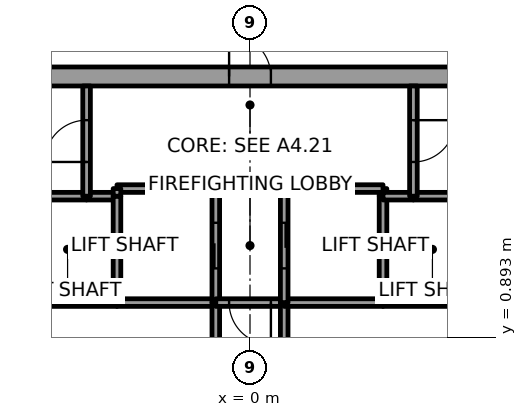
"""IFC4 building model, lengths in metres.
Left out: names, types, materials, properties, quantities, classifications, styles, units other than length and angle.
Written with IfcOpenShell. Run it as: python <this file> out.ifc"""

import sys

from ifc_helpers import new_model, si_unit, direction, frame, frame_2d, origin, place, context, subcontext, project, spatial, rectangle, extrude, element, fill, save


model = new_model("IFC4")
c1 = context("Model", 3, precision=1e-05, world=origin(), true_north=direction((0.0, 1.0)))
c2 = subcontext(c1, "Body", "Model", "MODEL_VIEW")
j1 = project(units=[si_unit("LENGTHUNIT", "METRE"), si_unit("PLANEANGLEUNIT", "RADIAN")], contexts=[c1])
p1 = place(None, origin())
s1 = spatial("IfcSite", under=j1, at=p1, CompositionType="ELEMENT")
p2 = place(p1, origin())
s2 = spatial("IfcBuilding", under=s1, at=p2, CompositionType="ELEMENT")
p3 = place(p2, frame((0.0, 0.0, 92.4)))
s3 = spatial("IfcBuildingStorey", under=s2, at=p3, CompositionType="ELEMENT", Elevation=92.4)
p4 = place(p3, frame((-11.0, 7.75, 0.0), z_axis=(0.0, 0.0, 1.0), x_axis=(1.0, 0.0, 0.0)))
e1 = element("IfcWall", 1, at=p4, inside=s3, PredefinedType="SHEAR", context=c2, shape_type="SweptSolid", body=[
    extrude(rectangle(XDim=22.0, YDim=0.5, at=frame_2d((11.0, 0.0))), origin(), (0.0, 0.0, 1.0), 3.7),
])
p5 = place(p4, frame((10.45, 0.0, 0.0)))
e2 = element("IfcOpeningElement", 2, at=p5, cuts=e1, PredefinedType="OPENING", context=c2, shape_type="SweptSolid", body=[
    extrude(rectangle(XDim=1.1, YDim=2.1, at=frame_2d((0.55, 1.05))), frame((0.0, 0.25, 0.0), z_axis=(0.0, -1.0, 0.0), x_axis=(1.0, 0.0, 0.0)), (0.0, 0.0, 1.0), 0.5),
])
p6 = place(p3, frame((-3.5, 1.8, 0.0), z_axis=(0.0, 0.0, 1.0), x_axis=(-1.0, 0.0, 0.0)))
e3 = element("IfcWall", 3, at=p6, inside=s3, PredefinedType="SOLIDWALL", context=c2, shape_type="SweptSolid", body=[
    extrude(rectangle(XDim=2.6, YDim=0.2, at=frame_2d((1.3, 0.0))), origin(), (0.0, 0.0, 1.0), 3.55),
])
p7 = place(p3, frame((-4.3, 4.6, 0.0), z_axis=(0.0, 0.0, 1.0), x_axis=(-1.0, 0.0, 0.0)))
e4 = element("IfcWall", 4, at=p7, inside=s3, PredefinedType="SOLIDWALL", context=c2, shape_type="SweptSolid", body=[
    extrude(rectangle(XDim=1.8, YDim=0.2, at=frame_2d((0.9, 0.0))), origin(), (0.0, 0.0, 1.0), 3.55),
])
p8 = place(p3, frame((-3.5, 4.6, 0.0), z_axis=(0.0, 0.0, 1.0), x_axis=(-1.0, 0.0, 0.0)))
e5 = element("IfcWall", 5, at=p8, inside=s3, PredefinedType="SOLIDWALL", context=c2, shape_type="SweptSolid", body=[
    extrude(rectangle(XDim=0.8, YDim=0.2, at=frame_2d((0.4, 0.0))), origin(), (0.0, 0.0, 1.0), 3.55),
])
p9 = place(p3, frame((-4.3, 4.6, 0.0), z_axis=(0.0, 0.0, 1.0), x_axis=(0.0, 1.0, 0.0)))
e6 = element("IfcWall", 6, at=p9, inside=s3, PredefinedType="SOLIDWALL", context=c2, shape_type="SweptSolid", body=[
    extrude(rectangle(XDim=2.9, YDim=0.2, at=frame_2d((1.45, 0.0))), origin(), (0.0, 0.0, 1.0), 3.55),
])
p10 = place(p9, frame((0.9, 0.0, 0.0)))
e7 = element("IfcOpeningElement", 7, at=p10, cuts=e6, PredefinedType="OPENING", context=c2, shape_type="SweptSolid", body=[
    extrude(rectangle(XDim=1.1, YDim=2.1, at=frame_2d((0.55, 1.05))), frame((0.0, 0.1, 0.0), z_axis=(0.0, -1.0, 0.0), x_axis=(1.0, 0.0, 0.0)), (0.0, 0.0, 1.0), 0.2),
])
p11 = place(p3, frame((-0.9, 1.8, 0.0), z_axis=(0.0, 0.0, 1.0), x_axis=(-1.0, 0.0, 0.0)))
e8 = element("IfcWall", 8, at=p11, inside=s3, PredefinedType="SOLIDWALL", context=c2, shape_type="SweptSolid", body=[
    extrude(rectangle(XDim=2.6, YDim=0.2, at=frame_2d((1.3, 0.0))), origin(), (0.0, 0.0, 1.0), 3.55),
])
p12 = place(p3, frame((-3.5, 4.6, 0.0), z_axis=(0.0, 0.0, 1.0), x_axis=(0.0, -1.0, 0.0)))
e9 = element("IfcWall", 9, at=p12, inside=s3, PredefinedType="SOLIDWALL", context=c2, shape_type="SweptSolid", body=[
    extrude(rectangle(XDim=2.8, YDim=0.2, at=frame_2d((1.4, 0.0))), origin(), (0.0, 0.0, 1.0), 3.55),
])
p13 = place(p3, frame((-0.9, 1.8, 0.0), z_axis=(0.0, 0.0, 1.0), x_axis=(0.0, 1.0, 0.0)))
e10 = element("IfcWall", 10, at=p13, inside=s3, PredefinedType="SOLIDWALL", context=c2, shape_type="SweptSolid", body=[
    extrude(rectangle(XDim=3.0, YDim=0.2, at=frame_2d((1.5, 0.0))), origin(), (0.0, 0.0, 1.0), 3.55),
])
p14 = place(p13, frame((0.9, 0.0, 0.0)))
e11 = element("IfcOpeningElement", 11, at=p14, cuts=e10, PredefinedType="OPENING", context=c2, shape_type="SweptSolid", body=[
    extrude(rectangle(XDim=1.2, YDim=2.1, at=frame_2d((0.6, 1.05))), frame((0.0, 0.1, 0.0), z_axis=(0.0, -1.0, 0.0), x_axis=(1.0, 0.0, 0.0)), (0.0, 0.0, 1.0), 0.2),
])
p15 = place(p3, frame((-0.9, 4.8, 0.0), z_axis=(0.0, 0.0, 1.0), x_axis=(-1.0, 0.0, 0.0)))
e12 = element("IfcWall", 12, at=p15, inside=s3, PredefinedType="SOLIDWALL", context=c2, shape_type="SweptSolid", body=[
    extrude(rectangle(XDim=2.6, YDim=0.2, at=frame_2d((1.3, 0.0))), origin(), (0.0, 0.0, 1.0), 3.55),
])
p16 = place(p3, frame((-3.5, 4.8, 0.0), z_axis=(0.0, 0.0, 1.0), x_axis=(0.0, -1.0, 0.0)))
e13 = element("IfcWall", 13, at=p16, inside=s3, PredefinedType="SOLIDWALL", context=c2, shape_type="SweptSolid", body=[
    extrude(rectangle(XDim=0.2, YDim=0.2, at=frame_2d((0.1, 0.0))), origin(), (0.0, 0.0, 1.0), 3.55),
])
p17 = place(p3, frame((-0.9, 1.8, 0.0), z_axis=(0.0, 0.0, 1.0), x_axis=(0.0, -1.0, 0.0)))
e14 = element("IfcWall", 14, at=p17, inside=s3, PredefinedType="SOLIDWALL", context=c2, shape_type="SweptSolid", body=[
    extrude(rectangle(XDim=3.6, YDim=0.2, at=frame_2d((1.8, 0.0))), origin(), (0.0, 0.0, 1.0), 3.55),
])
p18 = place(p17, frame((1.05, 0.0, 0.0)))
e15 = element("IfcOpeningElement", 15, at=p18, cuts=e14, PredefinedType="OPENING", context=c2, shape_type="SweptSolid", body=[
    extrude(rectangle(XDim=1.5, YDim=2.1, at=frame_2d((0.75, 1.05))), frame((0.0, 0.1, 0.0), z_axis=(0.0, -1.0, 0.0), x_axis=(1.0, 0.0, 0.0)), (0.0, 0.0, 1.0), 0.2),
])
p19 = place(p3, frame((0.9, 1.8, 0.0), z_axis=(0.0, 0.0, 1.0), x_axis=(-1.0, 0.0, 0.0)))
e16 = element("IfcWall", 16, at=p19, inside=s3, PredefinedType="SOLIDWALL", context=c2, shape_type="SweptSolid", body=[
    extrude(rectangle(XDim=1.8, YDim=0.2, at=frame_2d((0.9, 0.0))), origin(), (0.0, 0.0, 1.0), 3.55),
])
p20 = place(p19, frame((0.35, 0.0, 0.0)))
e17 = element("IfcOpeningElement", 17, at=p20, cuts=e16, PredefinedType="OPENING", context=c2, shape_type="SweptSolid", body=[
    extrude(rectangle(XDim=1.1, YDim=2.1, at=frame_2d((0.55, 1.05))), frame((0.0, 0.1, 0.0), z_axis=(0.0, -1.0, 0.0), x_axis=(1.0, 0.0, 0.0)), (0.0, 0.0, 1.0), 0.2),
])
p21 = place(p3, frame((0.9, -1.8, 0.0), z_axis=(0.0, 0.0, 1.0), x_axis=(0.0, 1.0, 0.0)))
e18 = element("IfcWall", 18, at=p21, inside=s3, PredefinedType="SOLIDWALL", context=c2, shape_type="SweptSolid", body=[
    extrude(rectangle(XDim=3.6, YDim=0.2, at=frame_2d((1.8, 0.0))), origin(), (0.0, 0.0, 1.0), 3.55),
])
p22 = place(p21, frame((1.05, 0.0, 0.0)))
e19 = element("IfcOpeningElement", 19, at=p22, cuts=e18, PredefinedType="OPENING", context=c2, shape_type="SweptSolid", body=[
    extrude(rectangle(XDim=1.5, YDim=2.1, at=frame_2d((0.75, 1.05))), frame((0.0, 0.1, 0.0), z_axis=(0.0, -1.0, 0.0), x_axis=(1.0, 0.0, 0.0)), (0.0, 0.0, 1.0), 0.2),
])
p23 = place(p3, frame((3.5, 1.8, 0.0), z_axis=(0.0, 0.0, 1.0), x_axis=(-1.0, 0.0, 0.0)))
e20 = element("IfcWall", 20, at=p23, inside=s3, PredefinedType="SOLIDWALL", context=c2, shape_type="SweptSolid", body=[
    extrude(rectangle(XDim=2.6, YDim=0.2, at=frame_2d((1.3, 0.0))), origin(), (0.0, 0.0, 1.0), 3.55),
])
p24 = place(p3, frame((3.5, 4.6, 0.0), z_axis=(0.0, 0.0, 1.0), x_axis=(0.0, 1.0, 0.0)))
e21 = element("IfcWall", 21, at=p24, inside=s3, PredefinedType="SOLIDWALL", context=c2, shape_type="SweptSolid", body=[
    extrude(rectangle(XDim=0.2, YDim=0.2, at=frame_2d((0.1, 0.0))), origin(), (0.0, 0.0, 1.0), 3.55),
])
p25 = place(p3, frame((3.5, 4.8, 0.0), z_axis=(0.0, 0.0, 1.0), x_axis=(-1.0, 0.0, 0.0)))
e22 = element("IfcWall", 22, at=p25, inside=s3, PredefinedType="SOLIDWALL", context=c2, shape_type="SweptSolid", body=[
    extrude(rectangle(XDim=2.6, YDim=0.2, at=frame_2d((1.3, 0.0))), origin(), (0.0, 0.0, 1.0), 3.55),
])
p26 = place(p3, frame((0.9, 4.8, 0.0), z_axis=(0.0, 0.0, 1.0), x_axis=(0.0, -1.0, 0.0)))
e23 = element("IfcWall", 23, at=p26, inside=s3, PredefinedType="SOLIDWALL", context=c2, shape_type="SweptSolid", body=[
    extrude(rectangle(XDim=3.0, YDim=0.2, at=frame_2d((1.5, 0.0))), origin(), (0.0, 0.0, 1.0), 3.55),
])
p27 = place(p26, frame((0.9, 0.0, 0.0)))
e24 = element("IfcOpeningElement", 24, at=p27, cuts=e23, PredefinedType="OPENING", context=c2, shape_type="SweptSolid", body=[
    extrude(rectangle(XDim=1.2, YDim=2.1, at=frame_2d((0.6, 1.05))), frame((0.0, 0.1, 0.0), z_axis=(0.0, -1.0, 0.0), x_axis=(1.0, 0.0, 0.0)), (0.0, 0.0, 1.0), 0.2),
])
p28 = place(p3, frame((6.1, 1.8, 0.0), z_axis=(0.0, 0.0, 1.0), x_axis=(-1.0, 0.0, 0.0)))
e25 = element("IfcWall", 25, at=p28, inside=s3, PredefinedType="SOLIDWALL", context=c2, shape_type="SweptSolid", body=[
    extrude(rectangle(XDim=2.6, YDim=0.2, at=frame_2d((1.3, 0.0))), origin(), (0.0, 0.0, 1.0), 3.55),
])
p29 = place(p3, frame((3.5, 1.8, 0.0), z_axis=(0.0, 0.0, 1.0), x_axis=(0.0, 1.0, 0.0)))
e26 = element("IfcWall", 26, at=p29, inside=s3, PredefinedType="SOLIDWALL", context=c2, shape_type="SweptSolid", body=[
    extrude(rectangle(XDim=2.8, YDim=0.2, at=frame_2d((1.4, 0.0))), origin(), (0.0, 0.0, 1.0), 3.55),
])
p30 = place(p3, frame((4.3, 4.6, 0.0), z_axis=(0.0, 0.0, 1.0), x_axis=(-1.0, 0.0, 0.0)))
e27 = element("IfcWall", 27, at=p30, inside=s3, PredefinedType="SOLIDWALL", context=c2, shape_type="SweptSolid", body=[
    extrude(rectangle(XDim=0.8, YDim=0.2, at=frame_2d((0.4, 0.0))), origin(), (0.0, 0.0, 1.0), 3.55),
])
p31 = place(p3, frame((6.1, 4.6, 0.0), z_axis=(0.0, 0.0, 1.0), x_axis=(-1.0, 0.0, 0.0)))
e28 = element("IfcWall", 28, at=p31, inside=s3, PredefinedType="SOLIDWALL", context=c2, shape_type="SweptSolid", body=[
    extrude(rectangle(XDim=1.8, YDim=0.2, at=frame_2d((0.9, 0.0))), origin(), (0.0, 0.0, 1.0), 3.55),
])
p32 = place(p3, frame((4.3, 7.5, 0.0), z_axis=(0.0, 0.0, 1.0), x_axis=(0.0, -1.0, 0.0)))
e29 = element("IfcWall", 29, at=p32, inside=s3, PredefinedType="SOLIDWALL", context=c2, shape_type="SweptSolid", body=[
    extrude(rectangle(XDim=2.9, YDim=0.2, at=frame_2d((1.45, 0.0))), origin(), (0.0, 0.0, 1.0), 3.55),
])
p33 = place(p32, frame((0.9, 0.0, 0.0)))
e30 = element("IfcOpeningElement", 30, at=p33, cuts=e29, PredefinedType="OPENING", context=c2, shape_type="SweptSolid", body=[
    extrude(rectangle(XDim=1.1, YDim=2.1, at=frame_2d((0.55, 1.05))), frame((0.0, 0.1, 0.0), z_axis=(0.0, -1.0, 0.0), x_axis=(1.0, 0.0, 0.0)), (0.0, 0.0, 1.0), 0.2),
])
p34 = place(p14, origin())
e31 = element("IfcDoor", 31, at=p34, inside=s3, OperationType="SLIDING_TO_RIGHT", PredefinedType="DOOR", context=c2, shape_type="SweptSolid", body=[
    extrude(rectangle(XDim=1.2, YDim=2.1, at=frame_2d((0.6, 1.05))), frame((0.0, 0.025, 0.0), z_axis=(0.0, -1.0, 0.0), x_axis=(1.0, 0.0, 0.0)), (0.0, 0.0, 1.0), 0.05),
])
fill(e11, e31)
p35 = place(p27, origin())
e32 = element("IfcDoor", 32, at=p35, inside=s3, OperationType="SLIDING_TO_LEFT", PredefinedType="DOOR", context=c2, shape_type="SweptSolid", body=[
    extrude(rectangle(XDim=1.2, YDim=2.1, at=frame_2d((0.6, 1.05))), frame((0.0, 0.025, 0.0), z_axis=(0.0, -1.0, 0.0), x_axis=(1.0, 0.0, 0.0)), (0.0, 0.0, 1.0), 0.05),
])
fill(e24, e32)
p36 = place(p20, origin())
e33 = element("IfcDoor", 33, at=p36, inside=s3, OperationType="SINGLE_SWING_RIGHT", PredefinedType="DOOR", context=c2, shape_type="SweptSolid", body=[
    extrude(rectangle(XDim=1.1, YDim=2.1, at=frame_2d((0.55, 1.05))), frame((0.0, 0.025, 0.0), z_axis=(0.0, -1.0, 0.0), x_axis=(1.0, 0.0, 0.0)), (0.0, 0.0, 1.0), 0.05),
])
fill(e17, e33)
p37 = place(p10, origin())
e34 = element("IfcDoor", 34, at=p37, inside=s3, OperationType="SINGLE_SWING_RIGHT", PredefinedType="DOOR", context=c2, shape_type="SweptSolid", body=[
    extrude(rectangle(XDim=1.1, YDim=2.1, at=frame_2d((0.55, 1.05))), frame((0.0, 0.025, 0.0), z_axis=(0.0, -1.0, 0.0), x_axis=(1.0, 0.0, 0.0)), (0.0, 0.0, 1.0), 0.05),
])
fill(e7, e34)
p38 = place(p33, origin())
e35 = element("IfcDoor", 35, at=p38, inside=s3, OperationType="SINGLE_SWING_LEFT", PredefinedType="DOOR", context=c2, shape_type="SweptSolid", body=[
    extrude(rectangle(XDim=1.1, YDim=2.1, at=frame_2d((0.55, 1.05))), frame((0.0, 0.025, 0.0), z_axis=(0.0, -1.0, 0.0), x_axis=(1.0, 0.0, 0.0)), (0.0, 0.0, 1.0), 0.05),
])
fill(e30, e35)
p39 = place(p5, origin())
e36 = element("IfcDoor", 36, at=p39, inside=s3, OperationType="SINGLE_SWING_LEFT", PredefinedType="DOOR", context=c2, shape_type="SweptSolid", body=[
    extrude(rectangle(XDim=1.1, YDim=2.1, at=frame_2d((0.55, 1.05))), frame((0.0, 0.025, 0.0), z_axis=(0.0, -1.0, 0.0), x_axis=(1.0, 0.0, 0.0)), (0.0, 0.0, 1.0), 0.05),
])
fill(e2, e36)
save(model, sys.argv[1])
